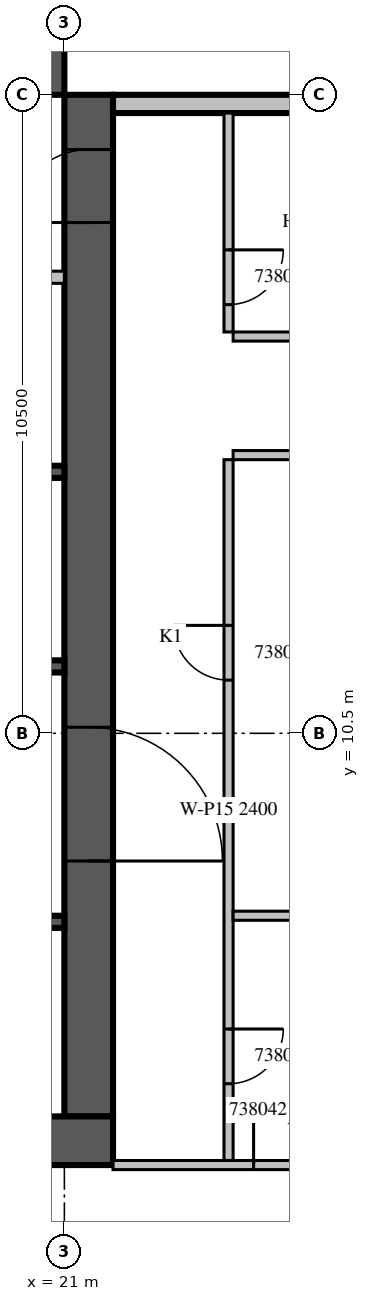
"""IFC4 building model, lengths in metres.
Left out: names, types, materials, properties, quantities, classifications, styles, units other than length and angle.
Written with IfcOpenShell. Run it as: python <this file> out.ifc"""

import sys

from ifc_helpers import new_model, si_unit, direction, frame, frame_2d, origin, place, context, subcontext, project, spatial, rectangle, extrude, source, transform, mapped, element, fill, save


model = new_model("IFC4")
c1 = context("Model", 3, precision=1e-05, world=origin(), true_north=direction((0.0, 1.0)))
c2 = subcontext(c1, "Body", "Model", "MODEL_VIEW")
j1 = project(units=[si_unit("LENGTHUNIT", "METRE"), si_unit("PLANEANGLEUNIT", "RADIAN")], contexts=[c1])
p1 = place(None, origin())
s1 = spatial("IfcSite", under=j1, at=p1, CompositionType="ELEMENT")
p2 = place(p1, origin())
s2 = spatial("IfcBuilding", under=s1, at=p2, CompositionType="ELEMENT")
p3 = place(p2, frame((0.0, 0.0, 177.8)))
s3 = spatial("IfcBuildingStorey", under=s2, at=p3, CompositionType="ELEMENT", Elevation=177.8)
p4 = place(p3, frame((21.4, 4.2, 0.0), z_axis=(0.0, 0.0, 1.0), x_axis=(0.0, 1.0, 0.0)))
e1 = element("IfcWall", 1, at=p4, inside=s3, PredefinedType="SHEAR", context=c2, shape_type="SweptSolid", body=[
    extrude(rectangle(XDim=16.8, YDim=0.8, at=frame_2d((8.4, 0.0))), origin(), (0.0, 0.0, 1.0), 3.8),
])
p5 = place(p4, frame((4.2, 0.0, 0.0)))
e2 = element("IfcOpeningElement", 2, at=p5, cuts=e1, PredefinedType="OPENING", context=c2, shape_type="SweptSolid", body=[
    extrude(rectangle(XDim=2.2, YDim=2.1, at=frame_2d((1.1, 1.05))), frame((0.0, 0.41, 0.0), z_axis=(0.0, -1.0, 0.0), x_axis=(1.0, 0.0, 0.0)), (0.0, 0.0, 1.0), 0.82),
])
m1 = source(origin(), c2, "Body", "SweptSolid", [
    extrude(rectangle(XDim=1.2, YDim=2.1, at=frame_2d((0.6, 1.05))), frame((0.0, 0.41, 0.0), z_axis=(0.0, -1.0, 0.0), x_axis=(1.0, 0.0, 0.0)), (0.0, 0.0, 1.0), 0.82),
])
p6 = place(p4, frame((14.7, 0.0, 0.0)))
e3 = element("IfcOpeningElement", 3, at=p6, cuts=e1, PredefinedType="OPENING", context=c2, shape_type="MappedRepresentation", body=[
    mapped(m1, transform((0.0, 0.0, 0.0), scale=1.0)),
])
m2 = source(origin(), c2, "Body", "SweptSolid", [
    extrude(rectangle(XDim=17.6, YDim=0.8, at=frame_2d((8.8, 0.0))), origin(), (0.0, 0.0, 1.0), 3.8),
])
p7 = place(p3, frame((4.2, 3.8, 0.0), z_axis=(0.0, 0.0, 1.0), x_axis=(1.0, 0.0, 0.0)))
e4 = element("IfcWall", 4, at=p7, inside=s3, PredefinedType="SHEAR", context=c2, shape_type="MappedRepresentation", body=[
    mapped(m2, transform((0.0, 0.0, 0.0), scale=1.0)),
])
m3 = source(origin(), c2, "Body", "SweptSolid", [
    extrude(rectangle(XDim=16.8, YDim=0.8, at=frame_2d((8.4, 0.0))), origin(), (0.0, 0.0, 1.0), 3.8),
])
p8 = place(p3, frame((4.2, 21.4, 0.0), z_axis=(0.0, 0.0, 1.0), x_axis=(1.0, 0.0, 0.0)))
e5 = element("IfcWall", 5, at=p8, inside=s3, PredefinedType="SHEAR", context=c2, shape_type="MappedRepresentation", body=[
    mapped(m3, transform((0.0, 0.0, 0.0), scale=1.0)),
])
p9 = place(p8, frame((6.2, 0.0, 0.0)))
e6 = element("IfcOpeningElement", 6, at=p9, cuts=e5, PredefinedType="OPENING", context=c2, shape_type="SweptSolid", body=[
    extrude(rectangle(XDim=1.2, YDim=2.1, at=frame_2d((0.6, 1.05))), frame((0.0, 0.41, 0.0), z_axis=(0.0, -1.0, 0.0), x_axis=(1.0, 0.0, 0.0)), (0.0, 0.0, 1.0), 0.82),
])
p10 = place(p3, frame((28.95, 20.85, 0.0), z_axis=(0.0, 0.0, 1.0), x_axis=(-1.0, 0.0, 0.0)))
e7 = element("IfcWall", 7, at=p10, inside=s3, PredefinedType="STANDARD", context=c2, shape_type="SweptSolid", body=[
    extrude(rectangle(XDim=7.15, YDim=0.3, at=frame_2d((3.575, 0.0))), origin(), (0.0, 0.0, 1.0), 3.4),
])
m4 = source(origin(), c2, "Body", "SweptSolid", [
    extrude(rectangle(XDim=3.0, YDim=2.3, at=frame_2d((1.5, 1.15))), frame((0.0, 0.16, 0.0), z_axis=(0.0, -1.0, 0.0), x_axis=(1.0, 0.0, 0.0)), (0.0, 0.0, 1.0), 0.32),
])
p11 = place(p10, frame((0.15, 0.0, 0.6)))
e8 = element("IfcOpeningElement", 8, at=p11, cuts=e7, PredefinedType="OPENING", context=c2, shape_type="MappedRepresentation", body=[
    mapped(m4, transform((0.0, 0.0, 0.0), scale=1.0)),
])
p12 = place(p3, frame((18.6, 7.4, 0.0), z_axis=(0.0, 0.0, 1.0), x_axis=(1.0, 0.0, 0.0)))
e9 = element("IfcWall", 9, at=p12, inside=s3, PredefinedType="SOLIDWALL", context=c2, shape_type="SweptSolid", body=[
    extrude(rectangle(XDim=2.4, YDim=0.2, at=frame_2d((1.2, 0.0))), origin(), (0.0, 0.0, 1.0), 3.8),
])
m5 = source(origin(), c2, "Body", "SweptSolid", [
    extrude(rectangle(XDim=9.6, YDim=0.2, at=frame_2d((4.8, 0.0))), origin(), (0.0, 0.0, 1.0), 3.8),
])
p13 = place(p3, frame((11.4, 11.6, 0.0), z_axis=(0.0, 0.0, 1.0), x_axis=(1.0, 0.0, 0.0)))
e10 = element("IfcWall", 10, at=p13, inside=s3, PredefinedType="SOLIDWALL", context=c2, shape_type="MappedRepresentation", body=[
    mapped(m5, transform((0.0, 0.0, 0.0), scale=1.0)),
])
p14 = place(p3, frame((11.4, 14.8, 0.0), z_axis=(0.0, 0.0, 1.0), x_axis=(1.0, 0.0, 0.0)))
e11 = element("IfcWall", 11, at=p14, inside=s3, PredefinedType="SOLIDWALL", context=c2, shape_type="MappedRepresentation", body=[
    mapped(m5, transform((0.0, 0.0, 0.0), scale=1.0)),
])
m6 = source(origin(), c2, "Body", "SweptSolid", [
    extrude(rectangle(XDim=1.1, YDim=2.1, at=frame_2d((0.55, 1.05))), frame((0.0, 0.11, 0.0), z_axis=(0.0, -1.0, 0.0), x_axis=(1.0, 0.0, 0.0)), (0.0, 0.0, 1.0), 0.22),
])
p15 = place(p14, frame((3.05, 0.0, 0.0)))
e12 = element("IfcOpeningElement", 12, at=p15, cuts=e11, PredefinedType="OPENING", context=c2, shape_type="MappedRepresentation", body=[
    mapped(m6, transform((0.0, 0.0, 0.0), scale=1.0)),
])
p16 = place(p14, frame((5.45, 0.0, 0.0)))
e13 = element("IfcOpeningElement", 13, at=p16, cuts=e11, PredefinedType="OPENING", context=c2, shape_type="MappedRepresentation", body=[
    mapped(m6, transform((0.0, 0.0, 0.0), scale=1.0)),
])
p17 = place(p14, frame((7.85, 0.0, 0.0)))
e14 = element("IfcOpeningElement", 14, at=p17, cuts=e11, PredefinedType="OPENING", context=c2, shape_type="MappedRepresentation", body=[
    mapped(m6, transform((0.0, 0.0, 0.0), scale=1.0)),
])
p18 = place(p3, frame((9.55, 18.0, 0.0), z_axis=(0.0, 0.0, 1.0), x_axis=(1.0, 0.0, 0.0)))
e15 = element("IfcWall", 15, at=p18, inside=s3, PredefinedType="PARTITIONING", context=c2, shape_type="SweptSolid", body=[
    extrude(rectangle(XDim=11.45, YDim=0.2, at=frame_2d((5.725, 0.0))), origin(), (0.0, 0.0, 1.0), 3.4),
])
m7 = source(origin(), c2, "Body", "SweptSolid", [
    extrude(rectangle(XDim=0.9, YDim=2.1, at=frame_2d((0.45, 1.05))), frame((0.0, 0.11, 0.0), z_axis=(0.0, -1.0, 0.0), x_axis=(1.0, 0.0, 0.0)), (0.0, 0.0, 1.0), 0.22),
])
p19 = place(p18, frame((0.375, 0.0, 0.0)))
e16 = element("IfcOpeningElement", 16, at=p19, cuts=e15, PredefinedType="OPENING", context=c2, shape_type="MappedRepresentation", body=[
    mapped(m7, transform((0.0, 0.0, 0.0), scale=1.0)),
])
p20 = place(p18, frame((1.7, 0.0, 0.0)))
e17 = element("IfcOpeningElement", 17, at=p20, cuts=e15, PredefinedType="OPENING", context=c2, shape_type="MappedRepresentation", body=[
    mapped(m7, transform((0.0, 0.0, 0.0), scale=1.0)),
])
p21 = place(p18, frame((3.075, 0.0, 0.0)))
e18 = element("IfcOpeningElement", 18, at=p21, cuts=e15, PredefinedType="OPENING", context=c2, shape_type="MappedRepresentation", body=[
    mapped(m7, transform((0.0, 0.0, 0.0), scale=1.0)),
])
p22 = place(p18, frame((7.35, 0.0, 0.0)))
e19 = element("IfcOpeningElement", 19, at=p22, cuts=e15, PredefinedType="OPENING", context=c2, shape_type="MappedRepresentation", body=[
    mapped(m6, transform((0.0, 0.0, 0.0), scale=1.0)),
])
p23 = place(p3, frame((23.7, 15.0, 0.0), z_axis=(0.0, 0.0, 1.0), x_axis=(0.0, -1.0, 0.0)))
e20 = element("IfcWall", 20, at=p23, inside=s3, PredefinedType="PARTITIONING", context=c2, shape_type="SweptSolid", body=[
    extrude(rectangle(XDim=11.525, YDim=0.15, at=frame_2d((5.763, 0.0))), origin(), (0.0, 0.0, 1.0), 2.4),
])
m8 = source(origin(), c2, "Body", "SweptSolid", [
    extrude(rectangle(XDim=0.9, YDim=2.1, at=frame_2d((0.45, 1.05))), frame((0.0, 0.085, 0.0), z_axis=(0.0, -1.0, 0.0), x_axis=(1.0, 0.0, 0.0)), (0.0, 0.0, 1.0), 0.17),
])
p24 = place(p23, frame((9.363, 0.0, 0.0)))
e21 = element("IfcOpeningElement", 21, at=p24, cuts=e20, PredefinedType="OPENING", context=c2, shape_type="MappedRepresentation", body=[
    mapped(m8, transform((0.0, 0.0, 0.0), scale=1.0)),
])
p25 = place(p23, frame((2.725, 0.0, 0.0)))
e22 = element("IfcOpeningElement", 22, at=p25, cuts=e20, PredefinedType="OPENING", context=c2, shape_type="MappedRepresentation", body=[
    mapped(m8, transform((0.0, 0.0, 0.0), scale=1.0)),
])
p26 = place(p3, frame((23.7, 20.7, 0.0), z_axis=(0.0, 0.0, 1.0), x_axis=(0.0, -1.0, 0.0)))
e23 = element("IfcWall", 23, at=p26, inside=s3, PredefinedType="PARTITIONING", context=c2, shape_type="SweptSolid", body=[
    extrude(rectangle(XDim=3.6, YDim=0.15, at=frame_2d((1.8, 0.0))), origin(), (0.0, 0.0, 1.0), 3.4),
])
p27 = place(p26, frame((2.25, 0.0, 0.0)))
e24 = element("IfcOpeningElement", 24, at=p27, cuts=e23, PredefinedType="OPENING", context=c2, shape_type="MappedRepresentation", body=[
    mapped(m8, transform((0.0, 0.0, 0.0), scale=1.0)),
])
p28 = place(p3, frame((29.325, 7.5, 0.0), z_axis=(0.0, 0.0, 1.0), x_axis=(-1.0, 0.0, 0.0)))
e25 = element("IfcWall", 25, at=p28, inside=s3, PredefinedType="PARTITIONING", context=c2, shape_type="SweptSolid", body=[
    extrude(rectangle(XDim=5.55, YDim=0.15, at=frame_2d((2.775, 0.0))), origin(), (0.0, 0.0, 1.0), 2.9),
])
p29 = place(p3, frame((29.325, 15.075, 0.0), z_axis=(0.0, 0.0, 1.0), x_axis=(-1.0, 0.0, 0.0)))
e26 = element("IfcWall", 26, at=p29, inside=s3, PredefinedType="PARTITIONING", context=c2, shape_type="SweptSolid", body=[
    extrude(rectangle(XDim=5.55, YDim=0.15, at=frame_2d((2.775, 0.0))), origin(), (0.0, 0.0, 1.0), 3.4),
])
m9 = source(origin(), c2, "Body", "SweptSolid", [
    extrude(rectangle(XDim=5.55, YDim=0.15, at=frame_2d((2.775, 0.0))), origin(), (0.0, 0.0, 1.0), 3.4),
])
p30 = place(p3, frame((23.775, 17.025, 0.0), z_axis=(0.0, 0.0, 1.0), x_axis=(1.0, 0.0, 0.0)))
e27 = element("IfcWall", 27, at=p30, inside=s3, PredefinedType="PARTITIONING", context=c2, shape_type="MappedRepresentation", body=[
    mapped(m9, transform((0.0, 0.0, 0.0), scale=1.0)),
])
p31 = place(p3, frame((21.8, 3.4, 0.0), z_axis=(0.0, 0.0, 1.0), x_axis=(1.0, 0.0, 0.0)))
e28 = element("IfcWall", 28, at=p31, inside=s3, PredefinedType="PARTITIONING", context=c2, shape_type="SweptSolid", body=[
    extrude(rectangle(XDim=7.525, YDim=0.15, at=frame_2d((3.763, 0.0))), origin(), (0.0, 0.0, 1.0), 2.9),
])
m10 = source(origin(), c2, "Body", "SweptSolid", [
    extrude(rectangle(XDim=1.0, YDim=2.1, at=frame_2d((0.5, 1.05))), frame((0.0, 0.085, 0.0), z_axis=(0.0, -1.0, 0.0), x_axis=(1.0, 0.0, 0.0)), (0.0, 0.0, 1.0), 0.17),
])
p32 = place(p31, frame((3.3, 0.0, 0.0)))
e29 = element("IfcOpeningElement", 29, at=p32, cuts=e28, PredefinedType="OPENING", context=c2, shape_type="MappedRepresentation", body=[
    mapped(m10, transform((0.0, 0.0, 0.0), scale=1.0)),
])
p33 = place(p31, frame((2.312, 0.0, 0.0)))
e30 = element("IfcOpeningElement", 30, at=p33, cuts=e28, PredefinedType="OPENING", context=c2, shape_type="MappedRepresentation", body=[
    mapped(m8, transform((0.0, 0.0, 0.0), scale=1.0)),
])
m11 = source(origin(), c2, "Body", "SweptSolid", [
    extrude(rectangle(XDim=2.2, YDim=2.1, at=frame_2d((1.1, 1.05))), frame((0.0, 0.025, 0.0), z_axis=(0.0, -1.0, 0.0), x_axis=(1.0, 0.0, 0.0)), (0.0, 0.0, 1.0), 0.05),
])
p34 = place(p5, origin())
e31 = element("IfcDoor", 31, at=p34, inside=s3, OperationType="DOUBLE_DOOR_SINGLE_SWING", PredefinedType="DOOR", context=c2, shape_type="MappedRepresentation", body=[
    mapped(m11, transform((0.0, 0.0, 0.0), scale=1.0)),
])
fill(e2, e31)
m12 = source(origin(), c2, "Body", "SweptSolid", [
    extrude(rectangle(XDim=1.2, YDim=2.1, at=frame_2d((0.6, 1.05))), frame((0.0, 0.025, 0.0), z_axis=(0.0, -1.0, 0.0), x_axis=(1.0, 0.0, 0.0)), (0.0, 0.0, 1.0), 0.05),
])
p35 = place(p6, origin())
e32 = element("IfcDoor", 32, at=p35, inside=s3, OperationType="SINGLE_SWING_LEFT", PredefinedType="DOOR", context=c2, shape_type="MappedRepresentation", body=[
    mapped(m12, transform((0.0, 0.0, 0.0), scale=1.0)),
])
fill(e3, e32)
m13 = source(origin(), c2, "Body", "SweptSolid", [
    extrude(rectangle(XDim=0.9, YDim=2.1, at=frame_2d((0.45, 1.05))), frame((0.0, 0.025, 0.0), z_axis=(0.0, -1.0, 0.0), x_axis=(1.0, 0.0, 0.0)), (0.0, 0.0, 1.0), 0.05),
])
p36 = place(p24, origin())
e33 = element("IfcDoor", 33, at=p36, inside=s3, OperationType="SINGLE_SWING_LEFT", PredefinedType="DOOR", context=c2, shape_type="MappedRepresentation", body=[
    mapped(m13, transform((0.0, 0.0, 0.0), scale=1.0)),
])
fill(e21, e33)
p37 = place(p25, origin())
e34 = element("IfcDoor", 34, at=p37, inside=s3, OperationType="SINGLE_SWING_RIGHT", PredefinedType="DOOR", context=c2, shape_type="MappedRepresentation", body=[
    mapped(m13, transform((0.0, 0.0, 0.0), scale=1.0)),
])
fill(e22, e34)
p38 = place(p27, origin())
e35 = element("IfcDoor", 35, at=p38, inside=s3, OperationType="SINGLE_SWING_LEFT", PredefinedType="DOOR", context=c2, shape_type="MappedRepresentation", body=[
    mapped(m13, transform((0.0, 0.0, 0.0), scale=1.0)),
])
fill(e24, e35)
p39 = place(p33, origin())
e36 = element("IfcDoor", 36, at=p39, inside=s3, OperationType="SINGLE_SWING_LEFT", PredefinedType="DOOR", context=c2, shape_type="MappedRepresentation", body=[
    mapped(m13, transform((0.0, 0.0, 0.0), scale=1.0)),
])
fill(e30, e36)
save(model, sys.argv[1])
